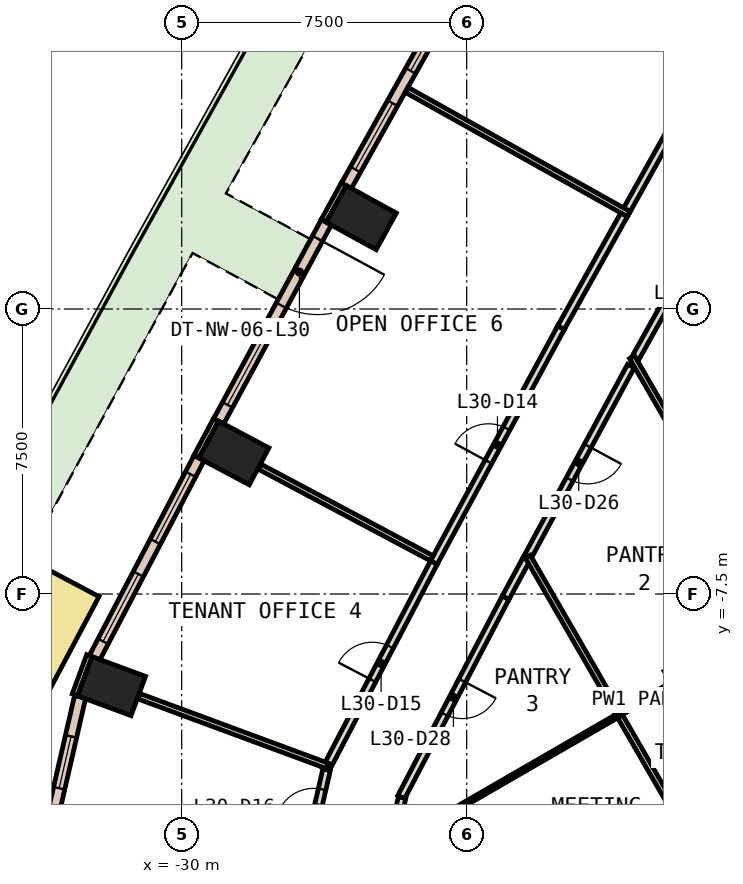
"""IFC4 building model, lengths in metres.
Left out: names, types, materials, properties, quantities, classifications, styles, units other than length and angle.
Written with IfcOpenShell. Run it as: python <this file> out.ifc"""

import sys

from ifc_helpers import new_model, si_unit, direction, frame, frame_2d, origin, origin_2d, place, context, subcontext, project, spatial, rectangle, extrude, element, fill, save


model = new_model("IFC4")
c1 = context("Model", 3, precision=1e-05, world=origin(), true_north=direction((0.0, 1.0)))
c2 = subcontext(c1, "Body", "Model", "MODEL_VIEW")
j1 = project(units=[si_unit("LENGTHUNIT", "METRE"), si_unit("PLANEANGLEUNIT", "RADIAN")], contexts=[c1])
p1 = place(None, origin())
s1 = spatial("IfcSite", under=j1, at=p1, CompositionType="ELEMENT")
p2 = place(p1, origin())
s2 = spatial("IfcBuilding", under=s1, at=p2, CompositionType="ELEMENT")
p3 = place(p2, frame((0.0, 0.0, 138.2)))
s3 = spatial("IfcBuildingStorey", under=s2, at=p3, CompositionType="ELEMENT", Elevation=138.2)
for number, where, z_axis, x_axis in (
    (1, (-25.275, 2.403, 0.0), (0.0, 0.0, 1.0), (0.482, 0.876, 0.0)),
    (2, (-28.626, -3.788, 0.0), (0.0, 0.0, 1.0), (0.47, 0.883, 0.0)),
    (3, (-31.846, -9.923, 0.0), (0.0, 0.0, 1.0), (0.347, 0.938, 0.0)),
):
    element("IfcColumn", number, at=place(p3, frame(where, z_axis=z_axis, x_axis=x_axis)), inside=s3, PredefinedType="COLUMN", context=c2, shape_type="SweptSolid", body=[
        extrude(rectangle(XDim=1.1, YDim=1.5, at=origin_2d()), origin(), (0.0, 0.0, 1.0), 3.8),
    ])
for number, where, z_axis, x_axis in (
    (4, (-25.733, 3.283, 0.0), (0.0, 0.0, 1.0), (-0.482, -0.876, 0.0)),
    (5, (-29.095, -2.915, 0.0), (0.0, 0.0, 1.0), (-0.47, -0.883, 0.0)),
    (6, (-32.429, -9.121, 0.0), (0.0, 0.0, 1.0), (-0.346, -0.938, 0.0)),
):
    element("IfcWall", number, at=place(p3, frame(where, z_axis=z_axis, x_axis=x_axis)), inside=s3, PredefinedType="STANDARD", context=c2, shape_type="SweptSolid", body=[
        extrude(rectangle(XDim=1.1, YDim=0.15, at=frame_2d((0.55, 0.0))), origin(), (0.0, 0.0, 1.0), 3.8),
    ])
p4 = place(p3, frame((-22.761, 8.438, 0.0), z_axis=(0.0, 0.0, 1.0), x_axis=(-0.488009846284, -0.872838123555, 0.0)))
e7 = element("IfcWall", 7, at=p4, inside=s3, PredefinedType="STANDARD", context=c2, shape_type="SweptSolid", body=[
    extrude(rectangle(XDim=5.951, YDim=0.3, at=frame_2d((2.976, 0.0))), origin(), (0.0, 0.0, 1.0), 3.8),
])
p5 = place(p4, frame((0.488, 0.0, 0.9)))
e8 = element("IfcOpeningElement", 8, at=p5, cuts=e7, PredefinedType="OPENING", context=c2, shape_type="SweptSolid", body=[
    extrude(rectangle(XDim=2.0, YDim=2.6, at=frame_2d((1.0, 1.3))), frame((0.0, 0.16, 0.0), z_axis=(0.0, -1.0, 0.0), x_axis=(1.0, 0.0, 0.0)), (0.0, 0.0, 1.0), 0.32),
])
p6 = place(p4, frame((3.463, 0.0, 0.9)))
e9 = element("IfcOpeningElement", 9, at=p6, cuts=e7, PredefinedType="OPENING", context=c2, shape_type="SweptSolid", body=[
    extrude(rectangle(XDim=2.0, YDim=2.6, at=frame_2d((1.0, 1.3))), frame((0.0, 0.16, 0.0), z_axis=(0.0, -1.0, 0.0), x_axis=(1.0, 0.0, 0.0)), (0.0, 0.0, 1.0), 0.32),
])
p7 = place(p3, frame((-26.194, 2.282, 0.0), z_axis=(0.0, 0.0, 1.0), x_axis=(-0.475794135288, -0.87955667289, 0.0)))
e10 = element("IfcWall", 10, at=p7, inside=s3, PredefinedType="STANDARD", context=c2, shape_type="SweptSolid", body=[
    extrude(rectangle(XDim=5.952, YDim=0.3, at=frame_2d((2.976, 0.0))), origin(), (0.0, 0.0, 1.0), 3.8),
])
p8 = place(p7, frame((0.488, 0.0, 0.0)))
e11 = element("IfcOpeningElement", 11, at=p8, cuts=e10, PredefinedType="OPENING", context=c2, shape_type="SweptSolid", body=[
    extrude(rectangle(XDim=2.0, YDim=2.4, at=frame_2d((1.0, 1.2))), frame((0.0, 0.16, 0.0), z_axis=(0.0, -1.0, 0.0), x_axis=(1.0, 0.0, 0.0)), (0.0, 0.0, 1.0), 0.32),
])
p9 = place(p7, frame((3.464, 0.0, 0.9)))
e12 = element("IfcOpeningElement", 12, at=p9, cuts=e10, PredefinedType="OPENING", context=c2, shape_type="SweptSolid", body=[
    extrude(rectangle(XDim=2.0, YDim=2.6, at=frame_2d((1.0, 1.3))), frame((0.0, 0.16, 0.0), z_axis=(0.0, -1.0, 0.0), x_axis=(1.0, 0.0, 0.0)), (0.0, 0.0, 1.0), 0.32),
])
p10 = place(p3, frame((-29.542, -3.922, 0.0), z_axis=(0.0, 0.0, 1.0), x_axis=(-0.463809970306, -0.885934710599, 0.0)))
e13 = element("IfcWall", 13, at=p10, inside=s3, PredefinedType="STANDARD", context=c2, shape_type="SweptSolid", body=[
    extrude(rectangle(XDim=5.927, YDim=0.3, at=frame_2d((2.963, 0.0))), origin(), (0.0, 0.0, 1.0), 3.8),
])
p11 = place(p10, frame((0.482, 0.0, 0.9)))
e14 = element("IfcOpeningElement", 14, at=p11, cuts=e13, PredefinedType="OPENING", context=c2, shape_type="SweptSolid", body=[
    extrude(rectangle(XDim=2.0, YDim=2.6, at=frame_2d((1.0, 1.3))), frame((0.0, 0.16, 0.0), z_axis=(0.0, -1.0, 0.0), x_axis=(1.0, 0.0, 0.0)), (0.0, 0.0, 1.0), 0.32),
])
p12 = place(p10, frame((3.445, 0.0, 0.9)))
e15 = element("IfcOpeningElement", 15, at=p12, cuts=e13, PredefinedType="OPENING", context=c2, shape_type="SweptSolid", body=[
    extrude(rectangle(XDim=2.0, YDim=2.6, at=frame_2d((1.0, 1.3))), frame((0.0, 0.16, 0.0), z_axis=(0.0, -1.0, 0.0), x_axis=(1.0, 0.0, 0.0)), (0.0, 0.0, 1.0), 0.32),
])
p13 = place(p3, frame((-32.672, -10.203, 0.0), z_axis=(0.0, 0.0, 1.0), x_axis=(-0.223538714932, -0.974695051247, 0.0)))
e16 = element("IfcWall", 16, at=p13, inside=s3, PredefinedType="STANDARD", context=c2, shape_type="SweptSolid", body=[
    extrude(rectangle(XDim=3.538, YDim=0.3, at=frame_2d((1.769, 0.0))), origin(), (0.0, 0.0, 1.0), 3.8),
])
p14 = place(p13, frame((1.069, 0.0, 0.9)))
e17 = element("IfcOpeningElement", 17, at=p14, cuts=e16, PredefinedType="OPENING", context=c2, shape_type="SweptSolid", body=[
    extrude(rectangle(XDim=1.4, YDim=2.6, at=frame_2d((0.7, 1.3))), frame((0.0, 0.16, 0.0), z_axis=(0.0, -1.0, 0.0), x_axis=(1.0, 0.0, 0.0)), (0.0, 0.0, 1.0), 0.32),
])
p15 = place(p3, frame((-33.015, -7.123, 0.0), z_axis=(0.0, 0.0, 1.0), x_axis=(-0.468724005249, -0.883344670501, 0.0)))
e18 = element("IfcWall", 18, at=p15, inside=s3, PredefinedType="STANDARD", context=c2, shape_type="SweptSolid", body=[
    extrude(rectangle(XDim=5.217, YDim=1.9, at=frame_2d((2.608, 0.0))), origin(), (0.0, 0.0, 1.0), 0.8),
])
p16 = place(p3, frame((-14.955, 4.264, 0.0), z_axis=(0.0, 0.0, 1.0), x_axis=(-0.4879770011, -0.872856486713, 0.0)))
e19 = element("IfcWall", 19, at=p16, inside=s3, PredefinedType="PARTITIONING", context=c2, shape_type="SweptSolid", body=[
    extrude(rectangle(XDim=6.363, YDim=0.2, at=frame_2d((3.182, 0.0))), origin(), (0.0, 0.0, 1.0), 3.8),
])
p17 = place(p16, frame((2.681, 0.0, 0.0)))
e20 = element("IfcOpeningElement", 20, at=p17, cuts=e19, PredefinedType="OPENING", context=c2, shape_type="SweptSolid", body=[
    extrude(rectangle(XDim=1.0, YDim=2.1, at=frame_2d((0.5, 1.05))), frame((0.0, 0.11, 0.0), z_axis=(0.0, -1.0, 0.0), x_axis=(1.0, 0.0, 0.0)), (0.0, 0.0, 1.0), 0.22),
])
p18 = place(p3, frame((-18.178, -1.501, 0.0), z_axis=(0.0, 0.0, 1.0), x_axis=(-0.475923642768, -0.879486603795, 0.0)))
e21 = element("IfcWall", 21, at=p18, inside=s3, PredefinedType="PARTITIONING", context=c2, shape_type="SweptSolid", body=[
    extrude(rectangle(XDim=5.776, YDim=0.2, at=frame_2d((2.888, 0.0))), origin(), (0.0, 0.0, 1.0), 3.8),
])
p19 = place(p18, frame((2.388, 0.0, 0.0)))
e22 = element("IfcOpeningElement", 22, at=p19, cuts=e21, PredefinedType="OPENING", context=c2, shape_type="SweptSolid", body=[
    extrude(rectangle(XDim=1.0, YDim=2.1, at=frame_2d((0.5, 1.05))), frame((0.0, 0.11, 0.0), z_axis=(0.0, -1.0, 0.0), x_axis=(1.0, 0.0, 0.0)), (0.0, 0.0, 1.0), 0.22),
])
p20 = place(p3, frame((-21.475, -7.594, 0.0), z_axis=(0.0, 0.0, 1.0), x_axis=(-0.463809970306, -0.885934710599, 0.0)))
e23 = element("IfcWall", 23, at=p20, inside=s3, PredefinedType="PARTITIONING", context=c2, shape_type="SweptSolid", body=[
    extrude(rectangle(XDim=5.927, YDim=0.2, at=frame_2d((2.963, 0.0))), origin(), (0.0, 0.0, 1.0), 3.8),
])
p21 = place(p20, frame((2.464, 0.0, 0.0)))
e24 = element("IfcOpeningElement", 24, at=p21, cuts=e23, PredefinedType="OPENING", context=c2, shape_type="SweptSolid", body=[
    extrude(rectangle(XDim=1.0, YDim=2.1, at=frame_2d((0.5, 1.05))), frame((0.0, 0.11, 0.0), z_axis=(0.0, -1.0, 0.0), x_axis=(1.0, 0.0, 0.0)), (0.0, 0.0, 1.0), 0.22),
])
p22 = place(p3, frame((-24.2, -12.854, 0.0), z_axis=(0.0, 0.0, 1.0), x_axis=(-0.223967203961, -0.974596681479, 0.0)))
e25 = element("IfcWall", 25, at=p22, inside=s3, PredefinedType="PARTITIONING", context=c2, shape_type="SweptSolid", body=[
    extrude(rectangle(XDim=1.259, YDim=0.2, at=frame_2d((0.629, 0.0))), origin(), (0.0, 0.0, 1.0), 3.8),
])
p23 = place(p3, frame((-20.927, -6.581, 0.0), z_axis=(0.0, 0.0, 1.0), x_axis=(-0.475893856394, -0.879502721682, 0.0)))
e26 = element("IfcWall", 26, at=p23, inside=s3, PredefinedType="PARTITIONING", context=c2, shape_type="SweptSolid", body=[
    extrude(rectangle(XDim=1.152, YDim=0.2, at=frame_2d((0.576, 0.0))), origin(), (0.0, 0.0, 1.0), 3.8),
])
p24 = place(p3, frame((-18.284, 2.612, 0.0), z_axis=(0.0, 0.0, 1.0), x_axis=(0.487871212611, 0.872915620152, 0.0)))
e27 = element("IfcWall", 27, at=p24, inside=s3, PredefinedType="PARTITIONING", context=c2, shape_type="SweptSolid", body=[
    extrude(rectangle(XDim=3.402, YDim=0.2, at=frame_2d((1.701, 0.0))), origin(), (0.0, 0.0, 1.0), 3.8),
])
p25 = place(p3, frame((-23.365, -6.673, 0.0), z_axis=(0.0, 0.0, 1.0), x_axis=(0.47597665142, 0.879457916732, 0.0)))
e28 = element("IfcWall", 28, at=p25, inside=s3, PredefinedType="PARTITIONING", context=c2, shape_type="SweptSolid", body=[
    extrude(rectangle(XDim=7.032, YDim=0.2, at=frame_2d((3.516, 0.0))), origin(), (0.0, 0.0, 1.0), 3.8),
])
p26 = place(p25, frame((3.016, 0.0, 0.0)))
e29 = element("IfcOpeningElement", 29, at=p26, cuts=e28, PredefinedType="OPENING", context=c2, shape_type="SweptSolid", body=[
    extrude(rectangle(XDim=1.0, YDim=2.1, at=frame_2d((0.5, 1.05))), frame((0.0, 0.11, 0.0), z_axis=(0.0, -1.0, 0.0), x_axis=(1.0, 0.0, 0.0)), (0.0, 0.0, 1.0), 0.22),
])
p27 = place(p3, frame((-20.018, -0.489, 0.0), z_axis=(0.0, 0.0, 1.0), x_axis=(0.48792588674, 0.872885060617, 0.0)))
e30 = element("IfcWall", 30, at=p27, inside=s3, PredefinedType="PARTITIONING", context=c2, shape_type="SweptSolid", body=[
    extrude(rectangle(XDim=3.403, YDim=0.2, at=frame_2d((1.701, 0.0))), origin(), (0.0, 0.0, 1.0), 3.8),
])
p28 = place(p3, frame((-26.21, -12.111, 0.0), z_axis=(0.0, 0.0, 1.0), x_axis=(0.46374980173, 0.885966207818, 0.0)))
e31 = element("IfcWall", 31, at=p28, inside=s3, PredefinedType="PARTITIONING", context=c2, shape_type="SweptSolid", body=[
    extrude(rectangle(XDim=6.137, YDim=0.2, at=frame_2d((3.068, 0.0))), origin(), (0.0, 0.0, 1.0), 3.8),
])
p29 = place(p28, frame((2.644, 0.0, 0.0)))
e32 = element("IfcOpeningElement", 32, at=p29, cuts=e31, PredefinedType="OPENING", context=c2, shape_type="SweptSolid", body=[
    extrude(rectangle(XDim=1.0, YDim=2.1, at=frame_2d((0.5, 1.05))), frame((0.0, 0.11, 0.0), z_axis=(0.0, -1.0, 0.0), x_axis=(1.0, 0.0, 0.0)), (0.0, 0.0, 1.0), 0.22),
])
p30 = place(p3, frame((-26.649, -14.133, 0.0), z_axis=(0.0, 0.0, 1.0), x_axis=(0.224108401048, 0.974564222912, 0.0)))
e33 = element("IfcWall", 33, at=p30, inside=s3, PredefinedType="PARTITIONING", context=c2, shape_type="SweptSolid", body=[
    extrude(rectangle(XDim=2.065, YDim=0.2, at=frame_2d((1.033, 0.0))), origin(), (0.0, 0.0, 1.0), 3.8),
])
p31 = place(p30, frame((0.533, 0.0, 0.0)))
e34 = element("IfcOpeningElement", 34, at=p31, cuts=e33, PredefinedType="OPENING", context=c2, shape_type="SweptSolid", body=[
    extrude(rectangle(XDim=1.0, YDim=2.1, at=frame_2d((0.5, 1.05))), frame((0.0, 0.11, 0.0), z_axis=(0.0, -1.0, 0.0), x_axis=(1.0, 0.0, 0.0)), (0.0, 0.0, 1.0), 0.22),
])
p32 = place(p3, frame((-14.567, -7.469, 0.0), z_axis=(0.0, 0.0, 1.0), x_axis=(-0.500056007527, 0.865993065409, 0.0)))
e35 = element("IfcWall", 35, at=p32, inside=s3, PredefinedType="PARTITIONING", context=c2, shape_type="SweptSolid", body=[
    extrude(rectangle(XDim=7.159, YDim=0.15, at=frame_2d((3.58, 0.0))), origin(), (0.0, 0.0, 1.0), 3.8),
])
p33 = place(p3, frame((-17.108, -9.869, 0.0), z_axis=(0.0, 0.0, 1.0), x_axis=(-0.866054481515, -0.499949632511, 0.0)))
e36 = element("IfcWall", 36, at=p33, inside=s3, PredefinedType="PARTITIONING", context=c2, shape_type="SweptSolid", body=[
    extrude(rectangle(XDim=1.675, YDim=0.1, at=frame_2d((0.837, 0.0))), origin(), (0.0, 0.0, 1.0), 3.8),
])
p34 = place(p3, frame((-18.518, -10.625, 0.0), z_axis=(0.0, 0.0, 1.0), x_axis=(-0.50001189137, 0.86601853819, 0.0)))
e37 = element("IfcWall", 37, at=p34, inside=s3, PredefinedType="PARTITIONING", context=c2, shape_type="SweptSolid", body=[
    extrude(rectangle(XDim=4.746, YDim=0.15, at=frame_2d((2.373, 0.0))), origin(), (0.0, 0.0, 1.0), 3.8),
])
p35 = place(p3, frame((-16.084, -14.841, 0.0), z_axis=(0.0, 0.0, 1.0), x_axis=(-0.50002451059, 0.866011252126, 0.0)))
e38 = element("IfcWall", 38, at=p35, inside=s3, PredefinedType="PARTITIONING", context=c2, shape_type="SweptSolid", body=[
    extrude(rectangle(XDim=4.758, YDim=0.15, at=frame_2d((2.379, 0.0))), origin(), (0.0, 0.0, 1.0), 3.8),
])
p36 = place(p3, frame((-18.553, -10.715, 0.0), z_axis=(0.0, 0.0, 1.0), x_axis=(-0.865984622623, -0.500070628392, 0.0)))
e39 = element("IfcWall", 39, at=p36, inside=s3, PredefinedType="PARTITIONING", context=c2, shape_type="SweptSolid", body=[
    extrude(rectangle(XDim=6.879, YDim=0.1, at=frame_2d((3.439, 0.0))), origin(), (0.0, 0.0, 1.0), 3.8),
])
p37 = place(p3, frame((-18.234, 2.497, 0.0), z_axis=(0.0, 0.0, 1.0), x_axis=(-0.872820235044, 0.4880418397, 0.0)))
e40 = element("IfcWall", 40, at=p37, inside=s3, PredefinedType="PARTITIONING", context=c2, shape_type="SweptSolid", body=[
    extrude(rectangle(XDim=6.7, YDim=0.15, at=frame_2d((3.35, 0.0))), origin(), (0.0, 0.0, 1.0), 3.8),
])
p38 = place(p3, frame((-23.417, -6.56, 0.0), z_axis=(0.0, 0.0, 1.0), x_axis=(-0.882784638588, 0.469777906967, 0.0)))
e41 = element("IfcWall", 41, at=p38, inside=s3, PredefinedType="PARTITIONING", context=c2, shape_type="SweptSolid", body=[
    extrude(rectangle(XDim=5.13, YDim=0.15, at=frame_2d((2.565, 0.0))), origin(), (0.0, 0.0, 1.0), 3.8),
])
p39 = place(p3, frame((-26.164, -12.023, 0.0), z_axis=(0.0, 0.0, 1.0), x_axis=(-0.937995804261, 0.346646608505, 0.0)))
e42 = element("IfcWall", 42, at=p39, inside=s3, PredefinedType="PARTITIONING", context=c2, shape_type="SweptSolid", body=[
    extrude(rectangle(XDim=5.288, YDim=0.15, at=frame_2d((2.644, 0.0))), origin(), (0.0, 0.0, 1.0), 3.8),
])
p40 = place(p5, origin())
e43 = element("IfcWindow", 43, at=p40, inside=s3, PartitioningType="SINGLE_PANEL", PredefinedType="WINDOW", context=c2, shape_type="SweptSolid", body=[
    extrude(rectangle(XDim=2.0, YDim=2.6, at=frame_2d((1.0, 1.3))), frame((0.0, 0.03, 0.0), z_axis=(0.0, -1.0, 0.0), x_axis=(1.0, 0.0, 0.0)), (0.0, 0.0, 1.0), 0.06),
])
fill(e8, e43)
p41 = place(p6, origin())
e44 = element("IfcWindow", 44, at=p41, inside=s3, PartitioningType="SINGLE_PANEL", PredefinedType="WINDOW", context=c2, shape_type="SweptSolid", body=[
    extrude(rectangle(XDim=2.0, YDim=2.6, at=frame_2d((1.0, 1.3))), frame((0.0, 0.03, 0.0), z_axis=(0.0, -1.0, 0.0), x_axis=(1.0, 0.0, 0.0)), (0.0, 0.0, 1.0), 0.06),
])
fill(e9, e44)
p42 = place(p8, origin())
e45 = element("IfcDoor", 45, at=p42, inside=s3, OperationType="SLIDING_TO_LEFT", PredefinedType="DOOR", context=c2, shape_type="SweptSolid", body=[
    extrude(rectangle(XDim=2.0, YDim=2.4, at=frame_2d((1.0, 1.2))), frame((0.0, 0.025, 0.0), z_axis=(0.0, -1.0, 0.0), x_axis=(1.0, 0.0, 0.0)), (0.0, 0.0, 1.0), 0.05),
])
fill(e11, e45)
p43 = place(p9, origin())
e46 = element("IfcWindow", 46, at=p43, inside=s3, PartitioningType="SINGLE_PANEL", PredefinedType="WINDOW", context=c2, shape_type="SweptSolid", body=[
    extrude(rectangle(XDim=2.0, YDim=2.6, at=frame_2d((1.0, 1.3))), frame((0.0, 0.03, 0.0), z_axis=(0.0, -1.0, 0.0), x_axis=(1.0, 0.0, 0.0)), (0.0, 0.0, 1.0), 0.06),
])
fill(e12, e46)
p44 = place(p11, origin())
e47 = element("IfcWindow", 47, at=p44, inside=s3, PartitioningType="SINGLE_PANEL", PredefinedType="WINDOW", context=c2, shape_type="SweptSolid", body=[
    extrude(rectangle(XDim=2.0, YDim=2.6, at=frame_2d((1.0, 1.3))), frame((0.0, 0.03, 0.0), z_axis=(0.0, -1.0, 0.0), x_axis=(1.0, 0.0, 0.0)), (0.0, 0.0, 1.0), 0.06),
])
fill(e14, e47)
p45 = place(p12, origin())
e48 = element("IfcWindow", 48, at=p45, inside=s3, PartitioningType="SINGLE_PANEL", PredefinedType="WINDOW", context=c2, shape_type="SweptSolid", body=[
    extrude(rectangle(XDim=2.0, YDim=2.6, at=frame_2d((1.0, 1.3))), frame((0.0, 0.03, 0.0), z_axis=(0.0, -1.0, 0.0), x_axis=(1.0, 0.0, 0.0)), (0.0, 0.0, 1.0), 0.06),
])
fill(e15, e48)
p46 = place(p14, origin())
e49 = element("IfcWindow", 49, at=p46, inside=s3, PartitioningType="SINGLE_PANEL", PredefinedType="WINDOW", context=c2, shape_type="SweptSolid", body=[
    extrude(rectangle(XDim=1.4, YDim=2.6, at=frame_2d((0.7, 1.3))), frame((0.0, 0.03, 0.0), z_axis=(0.0, -1.0, 0.0), x_axis=(1.0, 0.0, 0.0)), (0.0, 0.0, 1.0), 0.06),
])
fill(e17, e49)
p47 = place(p26, origin())
e50 = element("IfcDoor", 50, at=p47, inside=s3, OperationType="SINGLE_SWING_LEFT", PredefinedType="DOOR", context=c2, shape_type="SweptSolid", body=[
    extrude(rectangle(XDim=1.0, YDim=2.1, at=frame_2d((0.5, 1.05))), frame((0.0, 0.025, 0.0), z_axis=(0.0, -1.0, 0.0), x_axis=(1.0, 0.0, 0.0)), (0.0, 0.0, 1.0), 0.05),
])
fill(e29, e50)
p48 = place(p29, origin())
e51 = element("IfcDoor", 51, at=p48, inside=s3, OperationType="SINGLE_SWING_LEFT", PredefinedType="DOOR", context=c2, shape_type="SweptSolid", body=[
    extrude(rectangle(XDim=1.0, YDim=2.1, at=frame_2d((0.5, 1.05))), frame((0.0, 0.025, 0.0), z_axis=(0.0, -1.0, 0.0), x_axis=(1.0, 0.0, 0.0)), (0.0, 0.0, 1.0), 0.05),
])
fill(e32, e51)
p49 = place(p31, origin())
e52 = element("IfcDoor", 52, at=p49, inside=s3, OperationType="SINGLE_SWING_LEFT", PredefinedType="DOOR", context=c2, shape_type="SweptSolid", body=[
    extrude(rectangle(XDim=1.0, YDim=2.1, at=frame_2d((0.5, 1.05))), frame((0.0, 0.025, 0.0), z_axis=(0.0, -1.0, 0.0), x_axis=(1.0, 0.0, 0.0)), (0.0, 0.0, 1.0), 0.05),
])
fill(e34, e52)
p50 = place(p19, origin())
e53 = element("IfcDoor", 53, at=p50, inside=s3, OperationType="SINGLE_SWING_LEFT", PredefinedType="DOOR", context=c2, shape_type="SweptSolid", body=[
    extrude(rectangle(XDim=1.0, YDim=2.1, at=frame_2d((0.5, 1.05))), frame((0.0, 0.025, 0.0), z_axis=(0.0, -1.0, 0.0), x_axis=(1.0, 0.0, 0.0)), (0.0, 0.0, 1.0), 0.05),
])
fill(e22, e53)
p51 = place(p21, origin())
e54 = element("IfcDoor", 54, at=p51, inside=s3, OperationType="SINGLE_SWING_LEFT", PredefinedType="DOOR", context=c2, shape_type="SweptSolid", body=[
    extrude(rectangle(XDim=1.0, YDim=2.1, at=frame_2d((0.5, 1.05))), frame((0.0, 0.025, 0.0), z_axis=(0.0, -1.0, 0.0), x_axis=(1.0, 0.0, 0.0)), (0.0, 0.0, 1.0), 0.05),
])
fill(e24, e54)
save(model, sys.argv[1])
